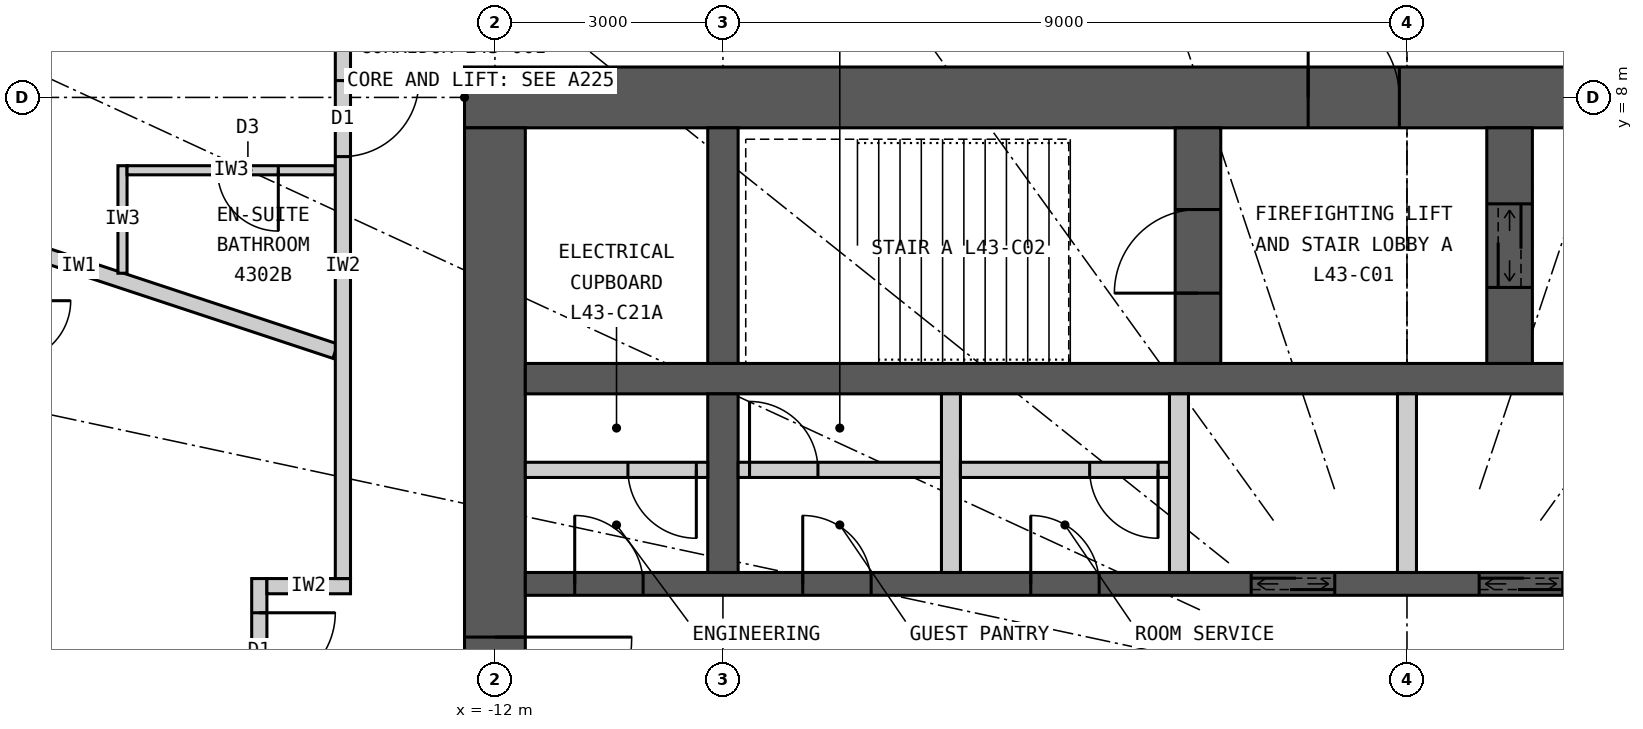
"""IFC4 building model, lengths in metres.
Left out: names, types, materials, properties, quantities, classifications, styles, units other than length and angle.
Written with IfcOpenShell. Run it as: python <this file> out.ifc"""

import sys

from ifc_helpers import new_model, si_unit, direction, frame, frame_2d, origin, place, context, subcontext, project, spatial, rectangle, extrude, element, fill, save


model = new_model("IFC4")
c1 = context("Model", 3, precision=1e-05, world=origin(), true_north=direction((0.0, 1.0)))
c2 = subcontext(c1, "Body", "Model", "MODEL_VIEW")
j1 = project(units=[si_unit("LENGTHUNIT", "METRE"), si_unit("PLANEANGLEUNIT", "RADIAN")], contexts=[c1])
p1 = place(None, origin())
s1 = spatial("IfcSite", under=j1, at=p1, CompositionType="ELEMENT")
p2 = place(p1, origin())
s2 = spatial("IfcBuilding", under=s1, at=p2, CompositionType="ELEMENT")
p3 = place(p2, frame((0.0, 0.0, 163.2)))
s3 = spatial("IfcBuildingStorey", under=s2, at=p3, CompositionType="ELEMENT", Elevation=163.2)
p4 = place(p3, frame((-12.4, 8.0, 0.0), z_axis=(0.0, 0.0, 1.0), x_axis=(1.0, 0.0, 0.0)))
e1 = element("IfcWall", 1, at=p4, inside=s3, PredefinedType="SHEAR", context=c2, shape_type="SweptSolid", body=[
    extrude(rectangle(XDim=24.8, YDim=0.8, at=frame_2d((12.4, 0.0))), origin(), (0.0, 0.0, 1.0), 3.3),
])
p5 = place(p4, frame((11.1, 0.0, 0.0)))
e2 = element("IfcOpeningElement", 2, at=p5, cuts=e1, PredefinedType="OPENING", context=c2, shape_type="SweptSolid", body=[
    extrude(rectangle(XDim=1.2, YDim=2.2, at=frame_2d((0.6, 1.1))), frame((0.0, 0.41, 0.0), z_axis=(0.0, -1.0, 0.0), x_axis=(1.0, 0.0, 0.0)), (0.0, 0.0, 1.0), 0.82),
])
p6 = place(p4, frame((18.7, 0.0, 0.0)))
e3 = element("IfcOpeningElement", 3, at=p6, cuts=e1, PredefinedType="OPENING", context=c2, shape_type="SweptSolid", body=[
    extrude(rectangle(XDim=0.9, YDim=2.2, at=frame_2d((0.45, 1.1))), frame((0.0, 0.41, 0.0), z_axis=(0.0, -1.0, 0.0), x_axis=(1.0, 0.0, 0.0)), (0.0, 0.0, 1.0), 0.82),
])
p7 = place(p3, frame((-12.0, 7.6, 0.0), z_axis=(0.0, 0.0, 1.0), x_axis=(0.0, -1.0, 0.0)))
e4 = element("IfcWall", 4, at=p7, inside=s3, PredefinedType="SHEAR", context=c2, shape_type="SweptSolid", body=[
    extrude(rectangle(XDim=15.2, YDim=0.8, at=frame_2d((7.6, 0.0))), origin(), (0.0, 0.0, 1.0), 3.3),
])
p8 = place(p7, frame((6.7, 0.0, 0.0)))
e5 = element("IfcOpeningElement", 5, at=p8, cuts=e4, PredefinedType="OPENING", context=c2, shape_type="SweptSolid", body=[
    extrude(rectangle(XDim=1.8, YDim=2.2, at=frame_2d((0.9, 1.1))), frame((0.0, 0.41, 0.0), z_axis=(0.0, -1.0, 0.0), x_axis=(1.0, 0.0, 0.0)), (0.0, 0.0, 1.0), 0.82),
])
p9 = place(p3, frame((-11.6, 4.3, 0.0), z_axis=(0.0, 0.0, 1.0), x_axis=(1.0, 0.0, 0.0)))
e6 = element("IfcWall", 6, at=p9, inside=s3, PredefinedType="SHEAR", context=c2, shape_type="SweptSolid", body=[
    extrude(rectangle(XDim=23.2, YDim=0.4, at=frame_2d((11.6, 0.0))), origin(), (0.0, 0.0, 1.0), 3.3),
])
p10 = place(p3, frame((-11.6, 1.6, 0.0), z_axis=(0.0, 0.0, 1.0), x_axis=(1.0, 0.0, 0.0)))
e7 = element("IfcWall", 7, at=p10, inside=s3, PredefinedType="SHEAR", context=c2, shape_type="SweptSolid", body=[
    extrude(rectangle(XDim=23.2, YDim=0.3, at=frame_2d((11.6, 0.0))), origin(), (0.0, 0.0, 1.0), 3.3),
])
p11 = place(p10, frame((9.55, 0.0, 0.0)))
e8 = element("IfcOpeningElement", 8, at=p11, cuts=e7, PredefinedType="OPENING", context=c2, shape_type="SweptSolid", body=[
    extrude(rectangle(XDim=1.1, YDim=2.2, at=frame_2d((0.55, 1.1))), frame((0.0, 0.16, 0.0), z_axis=(0.0, -1.0, 0.0), x_axis=(1.0, 0.0, 0.0)), (0.0, 0.0, 1.0), 0.32),
])
p12 = place(p10, frame((12.55, 0.0, 0.0)))
e9 = element("IfcOpeningElement", 9, at=p12, cuts=e7, PredefinedType="OPENING", context=c2, shape_type="SweptSolid", body=[
    extrude(rectangle(XDim=1.1, YDim=2.2, at=frame_2d((0.55, 1.1))), frame((0.0, 0.16, 0.0), z_axis=(0.0, -1.0, 0.0), x_axis=(1.0, 0.0, 0.0)), (0.0, 0.0, 1.0), 0.32),
])
p13 = place(p10, frame((0.65, 0.0, 0.0)))
e10 = element("IfcOpeningElement", 10, at=p13, cuts=e7, PredefinedType="OPENING", context=c2, shape_type="SweptSolid", body=[
    extrude(rectangle(XDim=0.9, YDim=2.2, at=frame_2d((0.45, 1.1))), frame((0.0, 0.16, 0.0), z_axis=(0.0, -1.0, 0.0), x_axis=(1.0, 0.0, 0.0)), (0.0, 0.0, 1.0), 0.32),
])
p14 = place(p10, frame((21.65, 0.0, 0.0)))
e11 = element("IfcOpeningElement", 11, at=p14, cuts=e7, PredefinedType="OPENING", context=c2, shape_type="SweptSolid", body=[
    extrude(rectangle(XDim=0.9, YDim=2.2, at=frame_2d((0.45, 1.1))), frame((0.0, 0.16, 0.0), z_axis=(0.0, -1.0, 0.0), x_axis=(1.0, 0.0, 0.0)), (0.0, 0.0, 1.0), 0.32),
])
p15 = place(p10, frame((3.65, 0.0, 0.0)))
e12 = element("IfcOpeningElement", 12, at=p15, cuts=e7, PredefinedType="OPENING", context=c2, shape_type="SweptSolid", body=[
    extrude(rectangle(XDim=0.9, YDim=2.2, at=frame_2d((0.45, 1.1))), frame((0.0, 0.16, 0.0), z_axis=(0.0, -1.0, 0.0), x_axis=(1.0, 0.0, 0.0)), (0.0, 0.0, 1.0), 0.32),
])
p16 = place(p10, frame((6.65, 0.0, 0.0)))
e13 = element("IfcOpeningElement", 13, at=p16, cuts=e7, PredefinedType="OPENING", context=c2, shape_type="SweptSolid", body=[
    extrude(rectangle(XDim=0.9, YDim=2.2, at=frame_2d((0.45, 1.1))), frame((0.0, 0.16, 0.0), z_axis=(0.0, -1.0, 0.0), x_axis=(1.0, 0.0, 0.0)), (0.0, 0.0, 1.0), 0.32),
])
p17 = place(p3, frame((-9.0, 4.5, 0.0), z_axis=(0.0, 0.0, 1.0), x_axis=(0.0, 1.0, 0.0)))
e14 = element("IfcWall", 14, at=p17, inside=s3, PredefinedType="SHEAR", context=c2, shape_type="SweptSolid", body=[
    extrude(rectangle(XDim=3.1, YDim=0.4, at=frame_2d((1.55, 0.0))), origin(), (0.0, 0.0, 1.0), 3.3),
])
p18 = place(p3, frame((-9.0, 1.75, 0.0), z_axis=(0.0, 0.0, 1.0), x_axis=(0.0, 1.0, 0.0)))
e15 = element("IfcWall", 15, at=p18, inside=s3, PredefinedType="SHEAR", context=c2, shape_type="SweptSolid", body=[
    extrude(rectangle(XDim=2.35, YDim=0.4, at=frame_2d((1.175, 0.0))), origin(), (0.0, 0.0, 1.0), 3.3),
])
p19 = place(p3, frame((-2.75, 4.5, 0.0), z_axis=(0.0, 0.0, 1.0), x_axis=(0.0, 1.0, 0.0)))
e16 = element("IfcWall", 16, at=p19, inside=s3, PredefinedType="SHEAR", context=c2, shape_type="SweptSolid", body=[
    extrude(rectangle(XDim=3.1, YDim=0.6, at=frame_2d((1.55, 0.0))), origin(), (0.0, 0.0, 1.0), 3.3),
])
p20 = place(p19, frame((0.925, 0.0, 0.0)))
e17 = element("IfcOpeningElement", 17, at=p20, cuts=e16, PredefinedType="OPENING", context=c2, shape_type="SweptSolid", body=[
    extrude(rectangle(XDim=1.1, YDim=2.2, at=frame_2d((0.55, 1.1))), frame((0.0, 0.31, 0.0), z_axis=(0.0, -1.0, 0.0), x_axis=(1.0, 0.0, 0.0)), (0.0, 0.0, 1.0), 0.62),
])
p21 = place(p3, frame((1.35, 4.5, 0.0), z_axis=(0.0, 0.0, 1.0), x_axis=(0.0, 1.0, 0.0)))
e18 = element("IfcWall", 18, at=p21, inside=s3, PredefinedType="SHEAR", context=c2, shape_type="SweptSolid", body=[
    extrude(rectangle(XDim=3.1, YDim=0.6, at=frame_2d((1.55, 0.0))), origin(), (0.0, 0.0, 1.0), 3.3),
])
p22 = place(p21, frame((1.0, 0.0, 0.0)))
e19 = element("IfcOpeningElement", 19, at=p22, cuts=e18, PredefinedType="OPENING", context=c2, shape_type="SweptSolid", body=[
    extrude(rectangle(XDim=1.1, YDim=2.2, at=frame_2d((0.55, 1.1))), frame((0.0, 0.31, 0.0), z_axis=(0.0, -1.0, 0.0), x_axis=(1.0, 0.0, 0.0)), (0.0, 0.0, 1.0), 0.62),
])
for number, where, z_axis, x_axis in (
    (20, (-6.0, 1.75, 0.0), (0.0, 0.0, 1.0), (0.0, 1.0, 0.0)),
    (21, (-3.0, 1.75, 0.0), (0.0, 0.0, 1.0), (0.0, 1.0, 0.0)),
    (22, (0.0, 1.75, 0.0), (0.0, 0.0, 1.0), (0.0, 1.0, 0.0)),
):
    element("IfcWall", number, at=place(p3, frame(where, z_axis=z_axis, x_axis=x_axis)), inside=s3, PredefinedType="PARTITIONING", context=c2, shape_type="SweptSolid", body=[
        extrude(rectangle(XDim=2.35, YDim=0.25, at=frame_2d((1.175, 0.0))), origin(), (0.0, 0.0, 1.0), 3.3),
    ])
p23 = place(p3, frame((-14.1, 4.661, 0.0), z_axis=(0.0, 0.0, 1.0), x_axis=(-0.949453216399, 0.313908569285, 0.0)))
e23 = element("IfcWall", 23, at=p23, inside=s3, PredefinedType="PARTITIONING", context=c2, shape_type="SweptSolid", body=[
    extrude(rectangle(XDim=7.109, YDim=0.2, at=frame_2d((3.554, 0.0))), origin(), (0.0, 0.0, 1.0), 3.12),
])
p24 = place(p3, frame((-15.1, 1.67, 0.0), z_axis=(0.0, 0.0, 1.0), x_axis=(0.0, -1.0, 0.0)))
e24 = element("IfcWall", 24, at=p24, inside=s3, PredefinedType="PARTITIONING", context=c2, shape_type="SweptSolid", body=[
    extrude(rectangle(XDim=3.34, YDim=0.2, at=frame_2d((1.67, 0.0))), origin(), (0.0, 0.0, 1.0), 3.12),
])
p25 = place(p24, frame((0.45, 0.0, 0.0)))
e25 = element("IfcOpeningElement", 25, at=p25, cuts=e24, PredefinedType="OPENING", context=c2, shape_type="SweptSolid", body=[
    extrude(rectangle(XDim=1.0, YDim=2.2, at=frame_2d((0.5, 1.1))), frame((0.0, 0.11, 0.0), z_axis=(0.0, -1.0, 0.0), x_axis=(1.0, 0.0, 0.0)), (0.0, 0.0, 1.0), 0.22),
])
p26 = place(p24, frame((1.89, 0.0, 0.0)))
e26 = element("IfcOpeningElement", 26, at=p26, cuts=e24, PredefinedType="OPENING", context=c2, shape_type="SweptSolid", body=[
    extrude(rectangle(XDim=1.0, YDim=2.2, at=frame_2d((0.5, 1.1))), frame((0.0, 0.11, 0.0), z_axis=(0.0, -1.0, 0.0), x_axis=(1.0, 0.0, 0.0)), (0.0, 0.0, 1.0), 0.22),
])
p27 = place(p3, frame((-13.9, 1.57, 0.0), z_axis=(0.0, 0.0, 1.0), x_axis=(-1.0, 0.0, 0.0)))
e27 = element("IfcWall", 27, at=p27, inside=s3, PredefinedType="PARTITIONING", context=c2, shape_type="SweptSolid", body=[
    extrude(rectangle(XDim=1.1, YDim=0.2, at=frame_2d((0.55, 0.0))), origin(), (0.0, 0.0, 1.0), 2.47),
])
p28 = place(p3, frame((-16.9, 5.687, 0.0), z_axis=(0.0, 0.0, 1.0), x_axis=(0.0, 1.0, 0.0)))
e28 = element("IfcWall", 28, at=p28, inside=s3, PredefinedType="PARTITIONING", context=c2, shape_type="SweptSolid", body=[
    extrude(rectangle(XDim=1.414, YDim=0.12, at=frame_2d((0.707, 0.0))), origin(), (0.0, 0.0, 1.0), 3.12),
])
p29 = place(p3, frame((-14.1, 7.042, 0.0), z_axis=(0.0, 0.0, 1.0), x_axis=(-1.0, 0.0, 0.0)))
e29 = element("IfcWall", 29, at=p29, inside=s3, PredefinedType="PARTITIONING", context=c2, shape_type="SweptSolid", body=[
    extrude(rectangle(XDim=2.74, YDim=0.12, at=frame_2d((1.37, 0.0))), origin(), (0.0, 0.0, 1.0), 3.12),
])
p30 = place(p29, frame((0.75, 0.0, 0.0)))
e30 = element("IfcOpeningElement", 30, at=p30, cuts=e29, PredefinedType="OPENING", context=c2, shape_type="SweptSolid", body=[
    extrude(rectangle(XDim=0.8, YDim=2.1, at=frame_2d((0.4, 1.05))), frame((0.0, 0.07, 0.0), z_axis=(0.0, -1.0, 0.0), x_axis=(1.0, 0.0, 0.0)), (0.0, 0.0, 1.0), 0.14),
])
p31 = place(p3, frame((-14.0, 9.9, 0.0), z_axis=(0.0, 0.0, 1.0), x_axis=(0.0, -1.0, 0.0)))
e31 = element("IfcWall", 31, at=p31, inside=s3, PredefinedType="PARTITIONING", context=c2, shape_type="SweptSolid", body=[
    extrude(rectangle(XDim=8.23, YDim=0.2, at=frame_2d((4.115, 0.0))), origin(), (0.0, 0.0, 1.0), 3.12),
])
p32 = place(p31, frame((1.678, 0.0, 0.0)))
e32 = element("IfcOpeningElement", 32, at=p32, cuts=e31, PredefinedType="OPENING", context=c2, shape_type="SweptSolid", body=[
    extrude(rectangle(XDim=1.0, YDim=2.2, at=frame_2d((0.5, 1.1))), frame((0.0, 0.11, 0.0), z_axis=(0.0, -1.0, 0.0), x_axis=(1.0, 0.0, 0.0)), (0.0, 0.0, 1.0), 0.22),
])
p33 = place(p3, frame((-11.6, 3.1, 0.0), z_axis=(0.0, 0.0, 1.0), x_axis=(1.0, 0.0, 0.0)))
e33 = element("IfcWall", 33, at=p33, inside=s3, PredefinedType="PARTITIONING", context=c2, shape_type="SweptSolid", body=[
    extrude(rectangle(XDim=2.4, YDim=0.2, at=frame_2d((1.2, 0.0))), origin(), (0.0, 0.0, 1.0), 3.12),
])
p34 = place(p33, frame((1.35, 0.0, 0.0)))
e34 = element("IfcOpeningElement", 34, at=p34, cuts=e33, PredefinedType="OPENING", context=c2, shape_type="SweptSolid", body=[
    extrude(rectangle(XDim=0.9, YDim=2.2, at=frame_2d((0.45, 1.1))), frame((0.0, 0.11, 0.0), z_axis=(0.0, -1.0, 0.0), x_axis=(1.0, 0.0, 0.0)), (0.0, 0.0, 1.0), 0.22),
])
p35 = place(p3, frame((-8.8, 3.1, 0.0), z_axis=(0.0, 0.0, 1.0), x_axis=(1.0, 0.0, 0.0)))
e35 = element("IfcWall", 35, at=p35, inside=s3, PredefinedType="PARTITIONING", context=c2, shape_type="SweptSolid", body=[
    extrude(rectangle(XDim=2.675, YDim=0.2, at=frame_2d((1.337, 0.0))), origin(), (0.0, 0.0, 1.0), 3.12),
])
p36 = place(p35, frame((0.15, 0.0, 0.0)))
e36 = element("IfcOpeningElement", 36, at=p36, cuts=e35, PredefinedType="OPENING", context=c2, shape_type="SweptSolid", body=[
    extrude(rectangle(XDim=0.9, YDim=2.2, at=frame_2d((0.45, 1.1))), frame((0.0, 0.11, 0.0), z_axis=(0.0, -1.0, 0.0), x_axis=(1.0, 0.0, 0.0)), (0.0, 0.0, 1.0), 0.22),
])
p37 = place(p3, frame((-5.875, 3.1, 0.0), z_axis=(0.0, 0.0, 1.0), x_axis=(1.0, 0.0, 0.0)))
e37 = element("IfcWall", 37, at=p37, inside=s3, PredefinedType="PARTITIONING", context=c2, shape_type="SweptSolid", body=[
    extrude(rectangle(XDim=2.75, YDim=0.2, at=frame_2d((1.375, 0.0))), origin(), (0.0, 0.0, 1.0), 3.12),
])
p38 = place(p37, frame((1.7, 0.0, 0.0)))
e38 = element("IfcOpeningElement", 38, at=p38, cuts=e37, PredefinedType="OPENING", context=c2, shape_type="SweptSolid", body=[
    extrude(rectangle(XDim=0.9, YDim=2.2, at=frame_2d((0.45, 1.1))), frame((0.0, 0.11, 0.0), z_axis=(0.0, -1.0, 0.0), x_axis=(1.0, 0.0, 0.0)), (0.0, 0.0, 1.0), 0.22),
])
p39 = place(p30, origin())
e39 = element("IfcDoor", 39, at=p39, inside=s3, OperationType="SINGLE_SWING_LEFT", PredefinedType="DOOR", context=c2, shape_type="SweptSolid", body=[
    extrude(rectangle(XDim=0.8, YDim=2.1, at=frame_2d((0.4, 1.05))), frame((0.0, 0.025, 0.0), z_axis=(0.0, -1.0, 0.0), x_axis=(1.0, 0.0, 0.0)), (0.0, 0.0, 1.0), 0.05),
])
fill(e30, e39)
p40 = place(p32, origin())
e40 = element("IfcDoor", 40, at=p40, inside=s3, OperationType="SINGLE_SWING_LEFT", PredefinedType="DOOR", context=c2, shape_type="SweptSolid", body=[
    extrude(rectangle(XDim=1.0, YDim=2.2, at=frame_2d((0.5, 1.1))), frame((0.0, 0.025, 0.0), z_axis=(0.0, -1.0, 0.0), x_axis=(1.0, 0.0, 0.0)), (0.0, 0.0, 1.0), 0.05),
])
fill(e32, e40)
p41 = place(p25, origin())
e41 = element("IfcDoor", 41, at=p41, inside=s3, OperationType="SINGLE_SWING_LEFT", PredefinedType="DOOR", context=c2, shape_type="SweptSolid", body=[
    extrude(rectangle(XDim=1.0, YDim=2.2, at=frame_2d((0.5, 1.1))), frame((0.0, 0.025, 0.0), z_axis=(0.0, -1.0, 0.0), x_axis=(1.0, 0.0, 0.0)), (0.0, 0.0, 1.0), 0.05),
])
fill(e25, e41)
p42 = place(p5, origin())
e42 = element("IfcDoor", 42, at=p42, inside=s3, OperationType="SINGLE_SWING_LEFT", PredefinedType="DOOR", context=c2, shape_type="SweptSolid", body=[
    extrude(rectangle(XDim=1.2, YDim=2.2, at=frame_2d((0.6, 1.1))), frame((0.0, 0.025, 0.0), z_axis=(0.0, -1.0, 0.0), x_axis=(1.0, 0.0, 0.0)), (0.0, 0.0, 1.0), 0.05),
])
fill(e2, e42)
p43 = place(p20, origin())
e43 = element("IfcDoor", 43, at=p43, inside=s3, OperationType="SINGLE_SWING_LEFT", PredefinedType="DOOR", context=c2, shape_type="SweptSolid", body=[
    extrude(rectangle(XDim=1.1, YDim=2.2, at=frame_2d((0.55, 1.1))), frame((0.0, 0.025, 0.0), z_axis=(0.0, -1.0, 0.0), x_axis=(1.0, 0.0, 0.0)), (0.0, 0.0, 1.0), 0.05),
])
fill(e17, e43)
p44 = place(p22, origin())
e44 = element("IfcDoor", 44, at=p44, inside=s3, OperationType="DOUBLE_DOOR_SLIDING", PredefinedType="DOOR", context=c2, shape_type="SweptSolid", body=[
    extrude(rectangle(XDim=1.1, YDim=2.2, at=frame_2d((0.55, 1.1))), frame((0.0, 0.025, 0.0), z_axis=(0.0, -1.0, 0.0), x_axis=(1.0, 0.0, 0.0)), (0.0, 0.0, 1.0), 0.05),
])
fill(e19, e44)
p45 = place(p11, origin())
e45 = element("IfcDoor", 45, at=p45, inside=s3, OperationType="DOUBLE_DOOR_SLIDING", PredefinedType="DOOR", context=c2, shape_type="SweptSolid", body=[
    extrude(rectangle(XDim=1.1, YDim=2.2, at=frame_2d((0.55, 1.1))), frame((0.0, 0.025, 0.0), z_axis=(0.0, -1.0, 0.0), x_axis=(1.0, 0.0, 0.0)), (0.0, 0.0, 1.0), 0.05),
])
fill(e8, e45)
p46 = place(p12, origin())
e46 = element("IfcDoor", 46, at=p46, inside=s3, OperationType="DOUBLE_DOOR_SLIDING", PredefinedType="DOOR", context=c2, shape_type="SweptSolid", body=[
    extrude(rectangle(XDim=1.1, YDim=2.2, at=frame_2d((0.55, 1.1))), frame((0.0, 0.025, 0.0), z_axis=(0.0, -1.0, 0.0), x_axis=(1.0, 0.0, 0.0)), (0.0, 0.0, 1.0), 0.05),
])
fill(e9, e46)
p47 = place(p34, origin())
e47 = element("IfcDoor", 47, at=p47, inside=s3, OperationType="SINGLE_SWING_RIGHT", PredefinedType="DOOR", context=c2, shape_type="SweptSolid", body=[
    extrude(rectangle(XDim=0.9, YDim=2.2, at=frame_2d((0.45, 1.1))), frame((0.0, 0.025, 0.0), z_axis=(0.0, -1.0, 0.0), x_axis=(1.0, 0.0, 0.0)), (0.0, 0.0, 1.0), 0.05),
])
fill(e34, e47)
p48 = place(p13, origin())
e48 = element("IfcDoor", 48, at=p48, inside=s3, OperationType="SINGLE_SWING_LEFT", PredefinedType="DOOR", context=c2, shape_type="SweptSolid", body=[
    extrude(rectangle(XDim=0.9, YDim=2.2, at=frame_2d((0.45, 1.1))), frame((0.0, 0.025, 0.0), z_axis=(0.0, -1.0, 0.0), x_axis=(1.0, 0.0, 0.0)), (0.0, 0.0, 1.0), 0.05),
])
fill(e10, e48)
p49 = place(p15, origin())
e49 = element("IfcDoor", 49, at=p49, inside=s3, OperationType="SINGLE_SWING_LEFT", PredefinedType="DOOR", context=c2, shape_type="SweptSolid", body=[
    extrude(rectangle(XDim=0.9, YDim=2.2, at=frame_2d((0.45, 1.1))), frame((0.0, 0.025, 0.0), z_axis=(0.0, -1.0, 0.0), x_axis=(1.0, 0.0, 0.0)), (0.0, 0.0, 1.0), 0.05),
])
fill(e12, e49)
p50 = place(p36, origin())
e50 = element("IfcDoor", 50, at=p50, inside=s3, OperationType="SINGLE_SWING_LEFT", PredefinedType="DOOR", context=c2, shape_type="SweptSolid", body=[
    extrude(rectangle(XDim=0.9, YDim=2.2, at=frame_2d((0.45, 1.1))), frame((0.0, 0.025, 0.0), z_axis=(0.0, -1.0, 0.0), x_axis=(1.0, 0.0, 0.0)), (0.0, 0.0, 1.0), 0.05),
])
fill(e36, e50)
p51 = place(p16, origin())
e51 = element("IfcDoor", 51, at=p51, inside=s3, OperationType="SINGLE_SWING_LEFT", PredefinedType="DOOR", context=c2, shape_type="SweptSolid", body=[
    extrude(rectangle(XDim=0.9, YDim=2.2, at=frame_2d((0.45, 1.1))), frame((0.0, 0.025, 0.0), z_axis=(0.0, -1.0, 0.0), x_axis=(1.0, 0.0, 0.0)), (0.0, 0.0, 1.0), 0.05),
])
fill(e13, e51)
p52 = place(p38, origin())
e52 = element("IfcDoor", 52, at=p52, inside=s3, OperationType="SINGLE_SWING_RIGHT", PredefinedType="DOOR", context=c2, shape_type="SweptSolid", body=[
    extrude(rectangle(XDim=0.9, YDim=2.2, at=frame_2d((0.45, 1.1))), frame((0.0, 0.025, 0.0), z_axis=(0.0, -1.0, 0.0), x_axis=(1.0, 0.0, 0.0)), (0.0, 0.0, 1.0), 0.05),
])
fill(e38, e52)
p53 = place(p8, origin())
e53 = element("IfcDoor", 53, at=p53, inside=s3, OperationType="DOUBLE_DOOR_DOUBLE_SWING", PredefinedType="DOOR", context=c2, shape_type="SweptSolid", body=[
    extrude(rectangle(XDim=1.8, YDim=2.2, at=frame_2d((0.9, 1.1))), frame((0.0, 0.025, 0.0), z_axis=(0.0, -1.0, 0.0), x_axis=(1.0, 0.0, 0.0)), (0.0, 0.0, 1.0), 0.05),
])
fill(e5, e53)
save(model, sys.argv[1])
